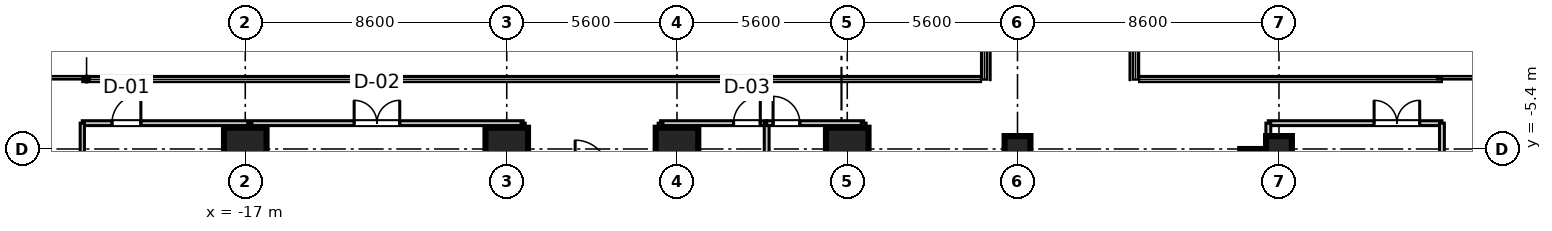
"""IFC4 building model, lengths in metres.
Left out: names, types, materials, properties, quantities, classifications, styles, units other than length and angle.
Written with IfcOpenShell. Run it as: python <this file> out.ifc"""

import sys

from ifc_helpers import new_model, si_unit, direction, frame, frame_2d, origin, origin_2d, place, context, subcontext, project, spatial, rectangle, extrude, source, transform, mapped, element, fill, save


model = new_model("IFC4")
c1 = context("Model", 3, precision=1e-05, world=origin(), true_north=direction((0.0, 1.0)))
c2 = subcontext(c1, "Body", "Model", "MODEL_VIEW")
j1 = project(units=[si_unit("LENGTHUNIT", "METRE"), si_unit("PLANEANGLEUNIT", "RADIAN")], contexts=[c1])
p1 = place(None, origin())
s1 = spatial("IfcSite", under=j1, at=p1, CompositionType="ELEMENT")
p2 = place(p1, origin())
s2 = spatial("IfcBuilding", under=s1, at=p2, CompositionType="ELEMENT")
p3 = place(p2, frame((0.0, 0.0, 68.9)))
s3 = spatial("IfcBuildingStorey", under=s2, at=p3, CompositionType="ELEMENT", Elevation=68.9)
m1 = source(origin(), c2, "Body", "SweptSolid", [
    extrude(rectangle(XDim=1.4, YDim=1.4, at=origin_2d()), origin(), (0.0, 0.0, 1.0), 3.605),
])
for number, where, z_axis, x_axis in (
    (1, (-17.0, -5.4, 0.0), (0.0, 0.0, 1.0), (1.0, 0.0, 0.0)),
    (2, (-8.4, -5.4, 0.0), (0.0, 0.0, 1.0), (1.0, 0.0, 0.0)),
    (3, (-2.8, -5.4, 0.0), (0.0, 0.0, 1.0), (1.0, 0.0, 0.0)),
    (4, (2.8, -5.4, 0.0), (0.0, 0.0, 1.0), (1.0, 0.0, 0.0)),
):
    element("IfcColumn", number, at=place(p3, frame(where, z_axis=z_axis, x_axis=x_axis)), inside=s3, PredefinedType="COLUMN", context=c2, shape_type="MappedRepresentation", body=[
        mapped(m1, transform((0.0, 0.0, 0.0), scale=1.0)),
    ])
m2 = source(origin(), c2, "Body", "SweptSolid", [
    extrude(rectangle(XDim=0.85, YDim=0.85, at=origin_2d()), origin(), (0.0, 0.0, 1.0), 3.605),
])
for number, where, z_axis, x_axis in (
    (5, (8.4, -5.4, 0.0), (0.0, 0.0, 1.0), (1.0, 0.0, 0.0)),
    (6, (17.0, -5.4, 0.0), (0.0, 0.0, 1.0), (1.0, 0.0, 0.0)),
):
    element("IfcColumn", number, at=place(p3, frame(where, z_axis=z_axis, x_axis=x_axis)), inside=s3, PredefinedType="PILASTER", context=c2, shape_type="MappedRepresentation", body=[
        mapped(m2, transform((0.0, 0.0, 0.0), scale=1.0)),
    ])
m3 = source(origin(), c2, "Body", "SweptSolid", [
    extrude(rectangle(XDim=11.6, YDim=0.65, at=frame_2d((5.8, 0.0))), origin(), (0.0, 0.0, 1.0), 3.37),
])
p4 = place(p3, frame((16.05, -17.0, 0.0), z_axis=(0.0, 0.0, 1.0), x_axis=(0.0, 1.0, 0.0)))
e7 = element("IfcWall", 7, at=p4, inside=s3, PredefinedType="SHEAR", context=c2, shape_type="MappedRepresentation", body=[
    mapped(m3, transform((0.0, 0.0, 0.0), scale=1.0)),
])
m4 = source(origin(), c2, "Body", "SweptSolid", [
    extrude(rectangle(XDim=5.71, YDim=0.16, at=frame_2d((2.855, 0.0))), origin(), (0.0, 0.0, 1.0), 2.71),
])
p5 = place(p3, frame((16.65, -4.55, 0.0), z_axis=(0.0, 0.0, 1.0), x_axis=(1.0, 0.0, 0.0)))
e8 = element("IfcWall", 8, at=p5, inside=s3, PredefinedType="PARTITIONING", context=c2, shape_type="MappedRepresentation", body=[
    mapped(m4, transform((0.0, 0.0, 0.0), scale=1.0)),
])
p6 = place(p5, frame((3.479, 0.0, 0.0)))
e9 = element("IfcOpeningElement", 9, at=p6, cuts=e8, PredefinedType="OPENING", context=c2, shape_type="SweptSolid", body=[
    extrude(rectangle(XDim=1.5, YDim=2.15, at=frame_2d((0.75, 1.075))), frame((0.0, 0.09, 0.0), z_axis=(0.0, -1.0, 0.0), x_axis=(1.0, 0.0, 0.0)), (0.0, 0.0, 1.0), 0.18),
])
m5 = source(origin(), c2, "Body", "SweptSolid", [
    extrude(rectangle(XDim=20.55, YDim=0.16, at=frame_2d((10.275, 0.0))), origin(), (0.0, 0.0, 1.0), 2.71),
])
p7 = place(p3, frame((16.65, -25.1, 0.0), z_axis=(0.0, 0.0, 1.0), x_axis=(0.0, 1.0, 0.0)))
e10 = element("IfcWall", 10, at=p7, inside=s3, PredefinedType="PARTITIONING", context=c2, shape_type="MappedRepresentation", body=[
    mapped(m5, transform((0.0, 0.0, 0.0), scale=1.0)),
])
m6 = source(origin(), c2, "Body", "SweptSolid", [
    extrude(rectangle(XDim=19.13, YDim=0.16, at=frame_2d((9.565, 0.0))), origin(), (0.0, 0.0, 1.0), 2.71),
])
p8 = place(p3, frame((22.36, -23.68, 0.0), z_axis=(0.0, 0.0, 1.0), x_axis=(0.0, 1.0, 0.0)))
e11 = element("IfcWall", 11, at=p8, inside=s3, PredefinedType="PARTITIONING", context=c2, shape_type="MappedRepresentation", body=[
    mapped(m6, transform((0.0, 0.0, 0.0), scale=1.0)),
])
m7 = source(origin(), c2, "Body", "SweptSolid", [
    extrude(rectangle(XDim=14.5, YDim=0.16, at=frame_2d((7.25, 0.0))), origin(), (0.0, 0.0, 1.0), 2.71),
])
p9 = place(p3, frame((-22.36, -4.55, 0.0), z_axis=(0.0, 0.0, 1.0), x_axis=(1.0, 0.0, 0.0)))
e12 = element("IfcWall", 12, at=p9, inside=s3, PredefinedType="PARTITIONING", context=c2, shape_type="MappedRepresentation", body=[
    mapped(m7, transform((0.0, 0.0, 0.0), scale=1.0)),
])
p10 = place(p9, frame((0.976, 0.0, 0.0)))
e13 = element("IfcOpeningElement", 13, at=p10, cuts=e12, PredefinedType="OPENING", context=c2, shape_type="SweptSolid", body=[
    extrude(rectangle(XDim=0.95, YDim=2.1, at=frame_2d((0.475, 1.05))), frame((0.0, 0.09, 0.0), z_axis=(0.0, -1.0, 0.0), x_axis=(1.0, 0.0, 0.0)), (0.0, 0.0, 1.0), 0.18),
])
p11 = place(p9, frame((8.941, 0.0, 0.0)))
e14 = element("IfcOpeningElement", 14, at=p11, cuts=e12, PredefinedType="OPENING", context=c2, shape_type="SweptSolid", body=[
    extrude(rectangle(XDim=1.5, YDim=2.15, at=frame_2d((0.75, 1.075))), frame((0.0, 0.09, 0.0), z_axis=(0.0, -1.0, 0.0), x_axis=(1.0, 0.0, 0.0)), (0.0, 0.0, 1.0), 0.18),
])
m8 = source(origin(), c2, "Body", "SweptSolid", [
    extrude(rectangle(XDim=19.13, YDim=0.14, at=frame_2d((9.565, 0.0))), origin(), (0.0, 0.0, 1.0), 2.71),
])
p12 = place(p3, frame((-22.36, -23.68, 0.0), z_axis=(0.0, 0.0, 1.0), x_axis=(0.0, 1.0, 0.0)))
e15 = element("IfcWall", 15, at=p12, inside=s3, PredefinedType="PARTITIONING", context=c2, shape_type="MappedRepresentation", body=[
    mapped(m8, transform((0.0, 0.0, 0.0), scale=1.0)),
])
m9 = source(origin(), c2, "Body", "SweptSolid", [
    extrude(rectangle(XDim=20.55, YDim=0.14, at=frame_2d((10.275, 0.0))), origin(), (0.0, 0.0, 1.0), 2.71),
])
for number, where, z_axis, x_axis in (
    (16, (-7.86, -25.1, 0.0), (0.0, 0.0, 1.0), (0.0, 1.0, 0.0)),
    (17, (-16.85, -25.1, 0.0), (0.0, 0.0, 1.0), (0.0, 1.0, 0.0)),
):
    element("IfcWall", number, at=place(p3, frame(where, z_axis=z_axis, x_axis=x_axis)), inside=s3, PredefinedType="PARTITIONING", context=c2, shape_type="MappedRepresentation", body=[
        mapped(m9, transform((0.0, 0.0, 0.0), scale=1.0)),
    ])
m10 = source(origin(), c2, "Body", "SweptSolid", [
    extrude(rectangle(XDim=3.49, YDim=0.16, at=frame_2d((1.745, 0.0))), origin(), (0.0, 0.0, 1.0), 2.71),
])
p13 = place(p3, frame((-3.34, -4.55, 0.0), z_axis=(0.0, 0.0, 1.0), x_axis=(1.0, 0.0, 0.0)))
e18 = element("IfcWall", 18, at=p13, inside=s3, PredefinedType="PARTITIONING", context=c2, shape_type="MappedRepresentation", body=[
    mapped(m10, transform((0.0, 0.0, 0.0), scale=1.0)),
])
p14 = place(p13, frame((2.4, 0.0, 0.0)))
e19 = element("IfcOpeningElement", 19, at=p14, cuts=e18, PredefinedType="OPENING", context=c2, shape_type="SweptSolid", body=[
    extrude(rectangle(XDim=0.88, YDim=2.1, at=frame_2d((0.44, 1.05))), frame((0.0, 0.09, 0.0), z_axis=(0.0, -1.0, 0.0), x_axis=(1.0, 0.0, 0.0)), (0.0, 0.0, 1.0), 0.18),
])
for number, where, z_axis, x_axis in (
    (20, (-3.34, -25.1, 0.0), (0.0, 0.0, 1.0), (0.0, 1.0, 0.0)),
    (21, (0.15, -25.1, 0.0), (0.0, 0.0, 1.0), (0.0, 1.0, 0.0)),
):
    element("IfcWall", number, at=place(p3, frame(where, z_axis=z_axis, x_axis=x_axis)), inside=s3, PredefinedType="PARTITIONING", context=c2, shape_type="MappedRepresentation", body=[
        mapped(m5, transform((0.0, 0.0, 0.0), scale=1.0)),
    ])
m11 = source(origin(), c2, "Body", "SweptSolid", [
    extrude(rectangle(XDim=3.19, YDim=0.16, at=frame_2d((1.595, 0.0))), origin(), (0.0, 0.0, 1.0), 2.71),
])
p15 = place(p3, frame((0.15, -4.55, 0.0), z_axis=(0.0, 0.0, 1.0), x_axis=(1.0, 0.0, 0.0)))
e22 = element("IfcWall", 22, at=p15, inside=s3, PredefinedType="PARTITIONING", context=c2, shape_type="MappedRepresentation", body=[
    mapped(m11, transform((0.0, 0.0, 0.0), scale=1.0)),
])
p16 = place(p15, frame((0.21, 0.0, 0.0)))
e23 = element("IfcOpeningElement", 23, at=p16, cuts=e22, PredefinedType="OPENING", context=c2, shape_type="SweptSolid", body=[
    extrude(rectangle(XDim=0.88, YDim=2.1, at=frame_2d((0.44, 1.05))), frame((0.0, 0.09, 0.0), z_axis=(0.0, -1.0, 0.0), x_axis=(1.0, 0.0, 0.0)), (0.0, 0.0, 1.0), 0.18),
])
p17 = place(p3, frame((3.34, -25.1, 0.0), z_axis=(0.0, 0.0, 1.0), x_axis=(0.0, 1.0, 0.0)))
e24 = element("IfcWall", 24, at=p17, inside=s3, PredefinedType="PARTITIONING", context=c2, shape_type="MappedRepresentation", body=[
    mapped(m5, transform((0.0, 0.0, 0.0), scale=1.0)),
])
m12 = source(origin(), c2, "Body", "SweptSolid", [
    extrude(rectangle(XDim=1.5, YDim=2.15, at=frame_2d((0.75, 1.075))), frame((0.0, 0.025, 0.0), z_axis=(0.0, -1.0, 0.0), x_axis=(1.0, 0.0, 0.0)), (0.0, 0.0, 1.0), 0.05),
])
p18 = place(p6, frame((1.5, 0.0, 0.0), z_axis=(0.0, 0.0, 1.0), x_axis=(-1.0, 0.0, 0.0)))
e25 = element("IfcDoor", 25, at=p18, inside=s3, OperationType="DOUBLE_DOOR_SINGLE_SWING", PredefinedType="DOOR", context=c2, shape_type="MappedRepresentation", body=[
    mapped(m12, transform((0.0, 0.0, 0.0), scale=1.0)),
])
fill(e9, e25)
m13 = source(origin(), c2, "Body", "SweptSolid", [
    extrude(rectangle(XDim=0.95, YDim=2.1, at=frame_2d((0.475, 1.05))), frame((0.0, 0.025, 0.0), z_axis=(0.0, -1.0, 0.0), x_axis=(1.0, 0.0, 0.0)), (0.0, 0.0, 1.0), 0.05),
])
p19 = place(p10, frame((0.95, 0.0, 0.0), z_axis=(0.0, 0.0, 1.0), x_axis=(-1.0, 0.0, 0.0)))
e26 = element("IfcDoor", 26, at=p19, inside=s3, OperationType="SINGLE_SWING_RIGHT", PredefinedType="DOOR", context=c2, shape_type="MappedRepresentation", body=[
    mapped(m13, transform((0.0, 0.0, 0.0), scale=1.0)),
])
fill(e13, e26)
p20 = place(p11, frame((1.5, 0.0, 0.0), z_axis=(0.0, 0.0, 1.0), x_axis=(-1.0, 0.0, 0.0)))
e27 = element("IfcDoor", 27, at=p20, inside=s3, OperationType="DOUBLE_DOOR_SINGLE_SWING", PredefinedType="DOOR", context=c2, shape_type="MappedRepresentation", body=[
    mapped(m12, transform((0.0, 0.0, 0.0), scale=1.0)),
])
fill(e14, e27)
m14 = source(origin(), c2, "Body", "SweptSolid", [
    extrude(rectangle(XDim=0.88, YDim=2.1, at=frame_2d((0.44, 1.05))), frame((0.0, 0.025, 0.0), z_axis=(0.0, -1.0, 0.0), x_axis=(1.0, 0.0, 0.0)), (0.0, 0.0, 1.0), 0.05),
])
p21 = place(p14, frame((0.88, 0.0, 0.0), z_axis=(0.0, 0.0, 1.0), x_axis=(-1.0, 0.0, 0.0)))
e28 = element("IfcDoor", 28, at=p21, inside=s3, OperationType="SINGLE_SWING_RIGHT", PredefinedType="DOOR", context=c2, shape_type="MappedRepresentation", body=[
    mapped(m14, transform((0.0, 0.0, 0.0), scale=1.0)),
])
fill(e19, e28)
p22 = place(p16, frame((0.88, 0.0, 0.0), z_axis=(0.0, 0.0, 1.0), x_axis=(-1.0, 0.0, 0.0)))
e29 = element("IfcDoor", 29, at=p22, inside=s3, OperationType="SINGLE_SWING_LEFT", PredefinedType="DOOR", context=c2, shape_type="MappedRepresentation", body=[
    mapped(m14, transform((0.0, 0.0, 0.0), scale=1.0)),
])
fill(e23, e29)
save(model, sys.argv[1])
